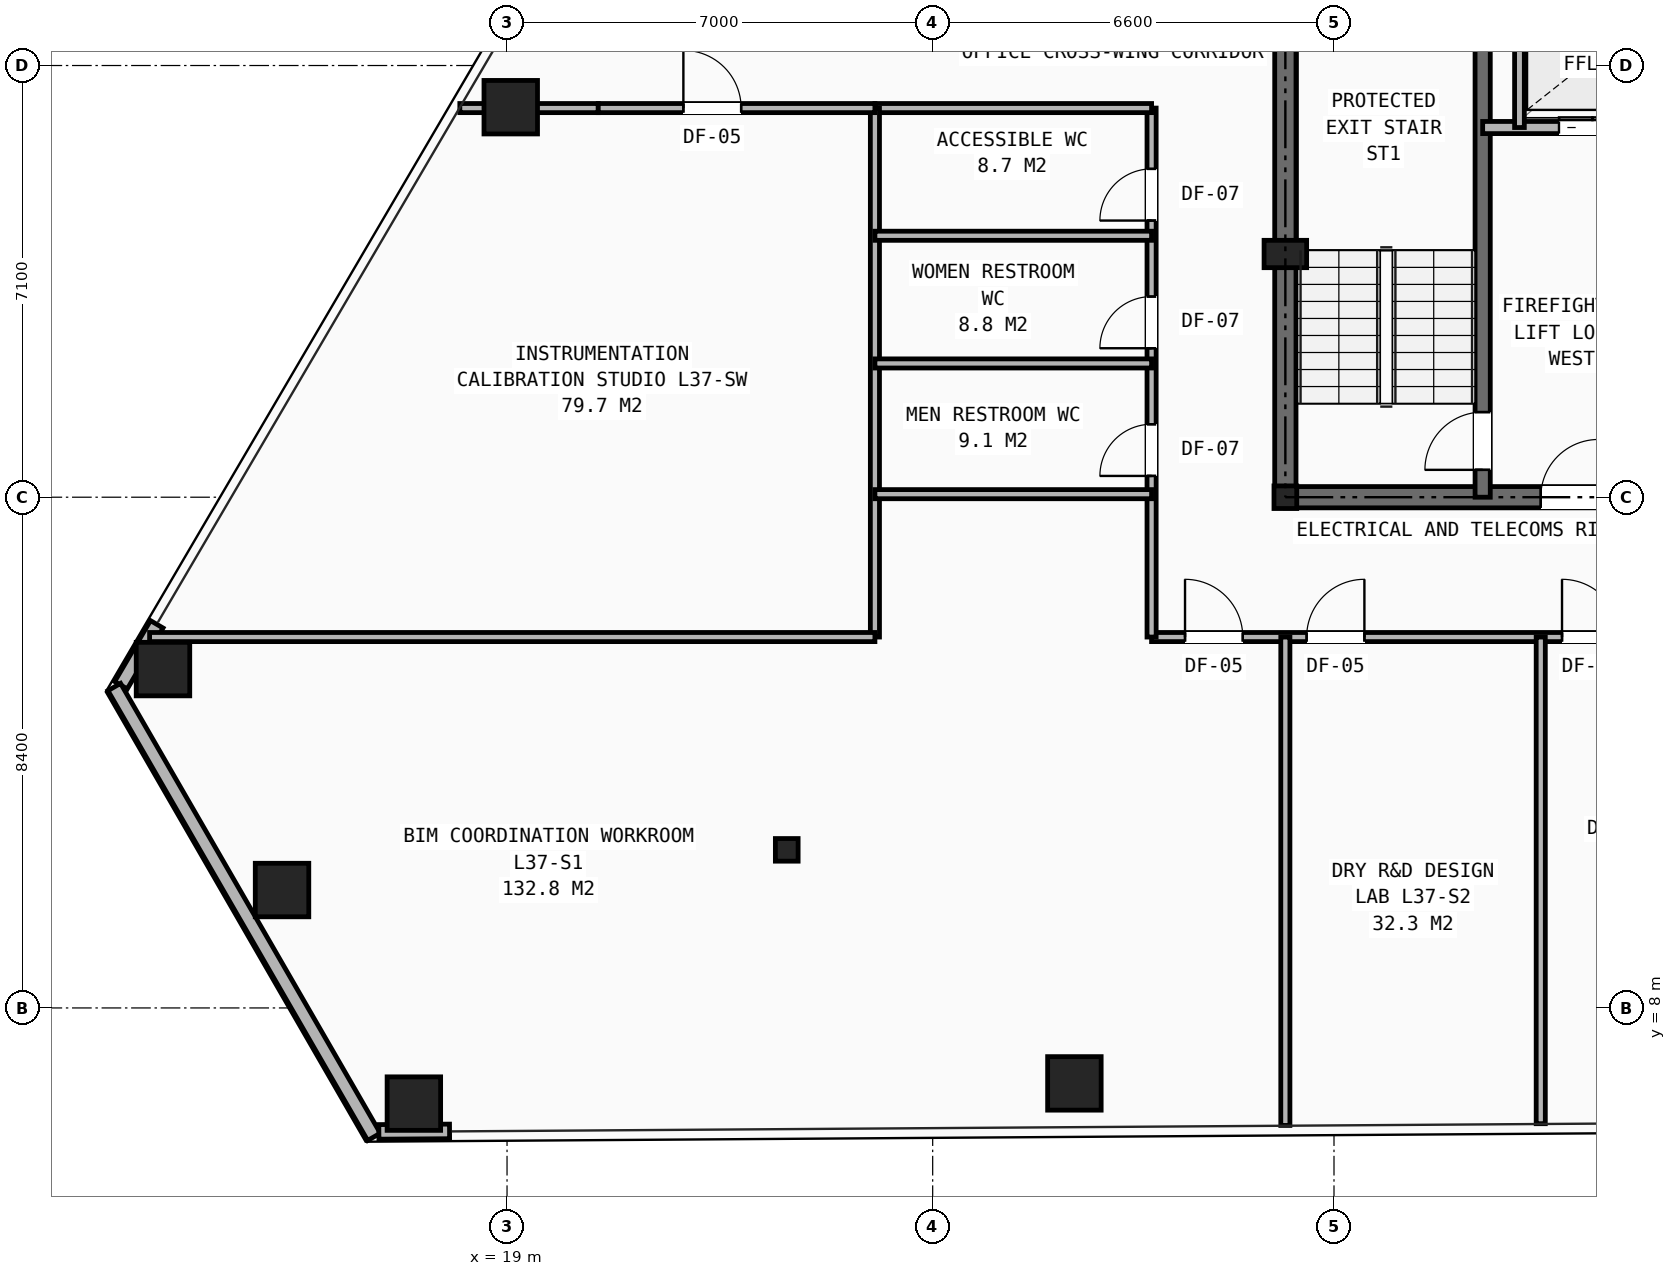
"""IFC4 building model, lengths in metres.
Left out: names, types, materials, properties, quantities, classifications, styles, units other than length and angle.
Written with IfcOpenShell. Run it as: python <this file> out.ifc"""

import sys

from ifc_helpers import new_model, si_unit, direction, frame, frame_2d, origin, origin_2d, place, context, subcontext, project, spatial, rectangle, hollow_rectangle, i_section, extrude, element, fill, save


model = new_model("IFC4")
c1 = context("Model", 3, precision=1e-05, world=origin(), true_north=direction((0.0, 1.0)))
c2 = subcontext(c1, "Body", "Model", "MODEL_VIEW")
j1 = project(units=[si_unit("LENGTHUNIT", "METRE"), si_unit("PLANEANGLEUNIT", "RADIAN")], contexts=[c1])
p1 = place(None, origin())
s1 = spatial("IfcSite", under=j1, at=p1, CompositionType="ELEMENT")
p2 = place(p1, origin())
s2 = spatial("IfcBuilding", under=s1, at=p2, CompositionType="ELEMENT")
p3 = place(p2, frame((0.0, 0.0, 129.8)))
s3 = spatial("IfcBuildingStorey", under=s2, at=p3, CompositionType="ELEMENT", Elevation=129.8)
for number, where, z_axis, x_axis in (
    (1, (31.8, 16.4, 0.0), (0.0, 0.0, 1.0), (1.0, 0.0, 0.0)),
    (2, (23.6, 10.6, 0.0), (0.0, 0.0, 1.0), (1.0, 0.0, 0.0)),
):
    element("IfcColumn", number, at=place(p3, frame(where, z_axis=z_axis, x_axis=x_axis)), inside=s3, PredefinedType="COLUMN", context=c2, shape_type="SweptSolid", body=[
        extrude(i_section(OverallWidth=0.374, OverallDepth=0.372, WebThickness=0.016, FlangeThickness=0.026, at=origin_2d()), origin(), (0.0, 0.0, 1.0), 3.45),
    ])
p4 = place(p3, frame((31.8, 20.4, 0.0), z_axis=(0.0, 0.0, 1.0), x_axis=(1.0, 0.0, 0.0)))
e3 = element("IfcColumn", 3, at=p4, inside=s3, PredefinedType="PILASTER", context=c2, shape_type="SweptSolid", body=[
    extrude(rectangle(XDim=0.7, YDim=0.45, at=origin_2d()), origin(), (0.0, 0.0, 1.0), 3.45),
])
for number, where, z_axis, x_axis in (
    (4, (19.061, 22.814, 0.0), (0.0, 0.0, 1.0), (1.0, 0.0, 0.0)),
    (5, (13.342, 13.573, 0.0), (0.0, 0.0, 1.0), (1.0, 0.0, 0.0)),
    (6, (15.3, 9.939, 0.0), (0.0, 0.0, 1.0), (1.0, 0.0, 0.0)),
    (7, (17.468, 6.427, 0.0), (0.0, 0.0, 1.0), (1.0, 0.0, 0.0)),
    (8, (28.331, 6.759, 0.0), (0.0, 0.0, 1.0), (1.0, 0.0, 0.0)),
):
    element("IfcColumn", number, at=place(p3, frame(where, z_axis=z_axis, x_axis=x_axis)), inside=s3, PredefinedType="COLUMN", context=c2, shape_type="SweptSolid", body=[
        extrude(hollow_rectangle(XDim=0.88, YDim=0.88, WallThickness=0.06, at=origin_2d()), origin(), (0.0, 0.0, 1.0), 3.45),
    ])
p5 = place(p3, frame((13.239, 14.31, 0.0), z_axis=(0.0, 0.0, 1.0), x_axis=(-0.505854218529, -0.862618982863, 0.0)))
e9 = element("IfcWall", 9, at=p5, inside=s3, PredefinedType="SHEAR", context=c2, shape_type="SweptSolid", body=[
    extrude(rectangle(XDim=1.163, YDim=0.24, at=frame_2d((0.581, 0.0))), origin(), (0.0, 0.0, 1.0), 2.583),
])
p6 = place(p3, frame((16.812, 5.88, 0.0), z_axis=(0.0, 0.0, 1.0), x_axis=(-0.499999516514, 0.866025682925, 0.0)))
e10 = element("IfcWall", 10, at=p6, inside=s3, PredefinedType="SHEAR", context=c2, shape_type="SweptSolid", body=[
    extrude(rectangle(XDim=8.543, YDim=0.24, at=frame_2d((4.271, 0.0))), origin(), (0.0, 0.0, 1.0), 2.583),
])
p7 = place(p3, frame((16.892, 5.961, 0.0), z_axis=(0.0, 0.0, 1.0), x_axis=(0.999977422468, 0.006719713885, 0.0)))
e11 = element("IfcWall", 11, at=p7, inside=s3, PredefinedType="SHEAR", context=c2, shape_type="SweptSolid", body=[
    extrude(rectangle(XDim=1.163, YDim=0.24, at=frame_2d((0.581, 0.0))), origin(), (0.0, 0.0, 1.0), 2.583),
])
p8 = place(p3, frame((31.8, 16.4, 0.0), z_axis=(0.0, 0.0, 1.0), x_axis=(1.0, 0.0, 0.0)))
e12 = element("IfcWall", 12, at=p8, inside=s3, PredefinedType="SHEAR", context=c2, shape_type="SweptSolid", body=[
    extrude(rectangle(XDim=16.4, YDim=0.35, at=frame_2d((8.2, 0.0))), origin(), (0.0, 0.0, 1.0), 3.21),
])
p9 = place(p8, frame((7.75, 0.0, 0.0)))
e13 = element("IfcOpeningElement", 13, at=p9, cuts=e12, PredefinedType="OPENING", context=c2, shape_type="SweptSolid", body=[
    extrude(rectangle(XDim=0.9, YDim=2.1, at=frame_2d((0.45, 1.05))), frame((0.0, 0.185, 0.0), z_axis=(0.0, -1.0, 0.0), x_axis=(1.0, 0.0, 0.0)), (0.0, 0.0, 1.0), 0.37),
])
p10 = place(p8, frame((4.2, 0.0, 0.0)))
e14 = element("IfcOpeningElement", 14, at=p10, cuts=e12, PredefinedType="OPENING", context=c2, shape_type="SweptSolid", body=[
    extrude(rectangle(XDim=0.95, YDim=2.1, at=frame_2d((0.475, 1.05))), frame((0.0, 0.185, 0.0), z_axis=(0.0, -1.0, 0.0), x_axis=(1.0, 0.0, 0.0)), (0.0, 0.0, 1.0), 0.37),
])
p11 = place(p8, frame((10.6, 0.0, 0.0)))
e15 = element("IfcOpeningElement", 15, at=p11, cuts=e12, PredefinedType="OPENING", context=c2, shape_type="SweptSolid", body=[
    extrude(rectangle(XDim=0.95, YDim=2.1, at=frame_2d((0.475, 1.05))), frame((0.0, 0.185, 0.0), z_axis=(0.0, -1.0, 0.0), x_axis=(1.0, 0.0, 0.0)), (0.0, 0.0, 1.0), 0.37),
])
p12 = place(p3, frame((31.8, 16.4, 0.0), z_axis=(0.0, 0.0, 1.0), x_axis=(0.0, 1.0, 0.0)))
e16 = element("IfcWall", 16, at=p12, inside=s3, PredefinedType="SHEAR", context=c2, shape_type="SweptSolid", body=[
    extrude(rectangle(XDim=14.8, YDim=0.35, at=frame_2d((7.4, 0.0))), origin(), (0.0, 0.0, 1.0), 3.21),
])
p13 = place(p12, frame((11.0, 0.0, 0.0)))
e17 = element("IfcOpeningElement", 17, at=p13, cuts=e16, PredefinedType="OPENING", context=c2, shape_type="SweptSolid", body=[
    extrude(rectangle(XDim=1.1, YDim=2.15, at=frame_2d((0.55, 1.075))), frame((0.0, 0.185, 0.0), z_axis=(0.0, -1.0, 0.0), x_axis=(1.0, 0.0, 0.0)), (0.0, 0.0, 1.0), 0.37),
])
p14 = place(p3, frame((35.045, 16.4, 0.0), z_axis=(0.0, 0.0, 1.0), x_axis=(0.0, 1.0, 0.0)))
e18 = element("IfcWall", 18, at=p14, inside=s3, PredefinedType="SHEAR", context=c2, shape_type="SweptSolid", body=[
    extrude(rectangle(XDim=8.4, YDim=0.25, at=frame_2d((4.2, 0.0))), origin(), (0.0, 0.0, 1.0), 3.21),
])
p15 = place(p14, frame((0.45, 0.0, 0.0)))
e19 = element("IfcOpeningElement", 19, at=p15, cuts=e18, PredefinedType="OPENING", context=c2, shape_type="SweptSolid", body=[
    extrude(rectangle(XDim=0.95, YDim=2.1, at=frame_2d((0.475, 1.05))), frame((0.0, 0.135, 0.0), z_axis=(0.0, -1.0, 0.0), x_axis=(1.0, 0.0, 0.0)), (0.0, 0.0, 1.0), 0.27),
])
p16 = place(p3, frame((35.045, 22.48, 0.0), z_axis=(0.0, 0.0, 1.0), x_axis=(1.0, 0.0, 0.0)))
e20 = element("IfcWall", 20, at=p16, inside=s3, PredefinedType="SOLIDWALL", context=c2, shape_type="SweptSolid", body=[
    extrude(rectangle(XDim=9.91, YDim=0.2, at=frame_2d((4.955, 0.0))), origin(), (0.0, 0.0, 1.0), 3.21),
])
p17 = place(p16, frame((1.255, 0.0, 0.0)))
e21 = element("IfcOpeningElement", 21, at=p17, cuts=e20, PredefinedType="OPENING", context=c2, shape_type="SweptSolid", body=[
    extrude(rectangle(XDim=1.1, YDim=2.15, at=frame_2d((0.55, 1.075))), frame((0.0, 0.11, 0.0), z_axis=(0.0, -1.0, 0.0), x_axis=(1.0, 0.0, 0.0)), (0.0, 0.0, 1.0), 0.22),
])
p18 = place(p16, frame((7.555, 0.0, 0.0)))
e22 = element("IfcOpeningElement", 22, at=p18, cuts=e20, PredefinedType="OPENING", context=c2, shape_type="SweptSolid", body=[
    extrude(rectangle(XDim=1.1, YDim=2.15, at=frame_2d((0.55, 1.075))), frame((0.0, 0.11, 0.0), z_axis=(0.0, -1.0, 0.0), x_axis=(1.0, 0.0, 0.0)), (0.0, 0.0, 1.0), 0.22),
])
p19 = place(p16, frame((4.405, 0.0, 0.0)))
e23 = element("IfcOpeningElement", 23, at=p19, cuts=e20, PredefinedType="OPENING", context=c2, shape_type="SweptSolid", body=[
    extrude(rectangle(XDim=1.1, YDim=2.15, at=frame_2d((0.55, 1.075))), frame((0.0, 0.11, 0.0), z_axis=(0.0, -1.0, 0.0), x_axis=(1.0, 0.0, 0.0)), (0.0, 0.0, 1.0), 0.22),
])
p20 = place(p3, frame((35.65, 22.48, 0.0), z_axis=(0.0, 0.0, 1.0), x_axis=(0.0, 1.0, 0.0)))
e24 = element("IfcWall", 24, at=p20, inside=s3, PredefinedType="SOLIDWALL", context=c2, shape_type="SweptSolid", body=[
    extrude(rectangle(XDim=2.32, YDim=0.16, at=frame_2d((1.16, 0.0))), origin(), (0.0, 0.0, 1.0), 3.21),
])
p21 = place(p3, frame((29.6, 14.1, 0.0), z_axis=(0.0, 0.0, 1.0), x_axis=(1.0, 0.0, 0.0)))
e25 = element("IfcWall", 25, at=p21, inside=s3, PredefinedType="PARTITIONING", context=c2, shape_type="SweptSolid", body=[
    extrude(rectangle(XDim=18.6, YDim=0.15, at=frame_2d((9.3, 0.0))), origin(), (0.0, 0.0, 1.0), 2.252),
])
p22 = place(p21, frame((0.55, 0.0, 0.0)))
e26 = element("IfcOpeningElement", 26, at=p22, cuts=e25, PredefinedType="OPENING", context=c2, shape_type="SweptSolid", body=[
    extrude(rectangle(XDim=0.95, YDim=2.1, at=frame_2d((0.475, 1.05))), frame((0.0, 0.085, 0.0), z_axis=(0.0, -1.0, 0.0), x_axis=(1.0, 0.0, 0.0)), (0.0, 0.0, 1.0), 0.17),
])
p23 = place(p21, frame((2.55, 0.0, 0.0)))
e27 = element("IfcOpeningElement", 27, at=p23, cuts=e25, PredefinedType="OPENING", context=c2, shape_type="SweptSolid", body=[
    extrude(rectangle(XDim=0.95, YDim=2.1, at=frame_2d((0.475, 1.05))), frame((0.0, 0.085, 0.0), z_axis=(0.0, -1.0, 0.0), x_axis=(1.0, 0.0, 0.0)), (0.0, 0.0, 1.0), 0.17),
])
p24 = place(p21, frame((6.75, 0.0, 0.0)))
e28 = element("IfcOpeningElement", 28, at=p24, cuts=e25, PredefinedType="OPENING", context=c2, shape_type="SweptSolid", body=[
    extrude(rectangle(XDim=0.95, YDim=2.1, at=frame_2d((0.475, 1.05))), frame((0.0, 0.085, 0.0), z_axis=(0.0, -1.0, 0.0), x_axis=(1.0, 0.0, 0.0)), (0.0, 0.0, 1.0), 0.17),
])
p25 = place(p21, frame((10.95, 0.0, 0.0)))
e29 = element("IfcOpeningElement", 29, at=p25, cuts=e25, PredefinedType="OPENING", context=c2, shape_type="SweptSolid", body=[
    extrude(rectangle(XDim=0.95, YDim=2.1, at=frame_2d((0.475, 1.05))), frame((0.0, 0.085, 0.0), z_axis=(0.0, -1.0, 0.0), x_axis=(1.0, 0.0, 0.0)), (0.0, 0.0, 1.0), 0.17),
])
p26 = place(p21, frame((15.15, 0.0, 0.0)))
e30 = element("IfcOpeningElement", 30, at=p26, cuts=e25, PredefinedType="OPENING", context=c2, shape_type="SweptSolid", body=[
    extrude(rectangle(XDim=0.95, YDim=2.1, at=frame_2d((0.475, 1.05))), frame((0.0, 0.085, 0.0), z_axis=(0.0, -1.0, 0.0), x_axis=(1.0, 0.0, 0.0)), (0.0, 0.0, 1.0), 0.17),
])
p27 = place(p3, frame((29.6, 14.1, 0.0), z_axis=(0.0, 0.0, 1.0), x_axis=(0.0, 1.0, 0.0)))
e31 = element("IfcWall", 31, at=p27, inside=s3, PredefinedType="PARTITIONING", context=c2, shape_type="SweptSolid", body=[
    extrude(rectangle(XDim=8.7, YDim=0.15, at=frame_2d((4.35, 0.0))), origin(), (0.0, 0.0, 1.0), 3.21),
])
p28 = place(p27, frame((2.65, 0.0, 0.0)))
e32 = element("IfcOpeningElement", 32, at=p28, cuts=e31, PredefinedType="OPENING", context=c2, shape_type="SweptSolid", body=[
    extrude(rectangle(XDim=0.85, YDim=2.05, at=frame_2d((0.425, 1.025))), frame((0.0, 0.085, 0.0), z_axis=(0.0, -1.0, 0.0), x_axis=(1.0, 0.0, 0.0)), (0.0, 0.0, 1.0), 0.17),
])
p29 = place(p27, frame((4.75, 0.0, 0.0)))
e33 = element("IfcOpeningElement", 33, at=p29, cuts=e31, PredefinedType="OPENING", context=c2, shape_type="SweptSolid", body=[
    extrude(rectangle(XDim=0.85, YDim=2.05, at=frame_2d((0.425, 1.025))), frame((0.0, 0.085, 0.0), z_axis=(0.0, -1.0, 0.0), x_axis=(1.0, 0.0, 0.0)), (0.0, 0.0, 1.0), 0.17),
])
p30 = place(p27, frame((6.85, 0.0, 0.0)))
e34 = element("IfcOpeningElement", 34, at=p30, cuts=e31, PredefinedType="OPENING", context=c2, shape_type="SweptSolid", body=[
    extrude(rectangle(XDim=0.85, YDim=2.05, at=frame_2d((0.425, 1.025))), frame((0.0, 0.085, 0.0), z_axis=(0.0, -1.0, 0.0), x_axis=(1.0, 0.0, 0.0)), (0.0, 0.0, 1.0), 0.17),
])
p31 = place(p3, frame((18.224, 22.8, 0.0), z_axis=(0.0, 0.0, 1.0), x_axis=(1.0, 0.0, 0.0)))
e35 = element("IfcWall", 35, at=p31, inside=s3, PredefinedType="PARTITIONING", context=c2, shape_type="SweptSolid", body=[
    extrude(rectangle(XDim=2.276, YDim=0.15, at=frame_2d((1.138, 0.0))), origin(), (0.0, 0.0, 1.0), 2.589),
])
p32 = place(p3, frame((25.05, 22.8, 0.0), z_axis=(0.0, 0.0, 1.0), x_axis=(1.0, 0.0, 0.0)))
e36 = element("IfcWall", 36, at=p32, inside=s3, PredefinedType="PARTITIONING", context=c2, shape_type="SweptSolid", body=[
    extrude(rectangle(XDim=4.55, YDim=0.15, at=frame_2d((2.275, 0.0))), origin(), (0.0, 0.0, 1.0), 3.21),
])
p33 = place(p3, frame((25.05, 14.1, 0.0), z_axis=(0.0, 0.0, 1.0), x_axis=(0.0, 1.0, 0.0)))
e37 = element("IfcWall", 37, at=p33, inside=s3, PredefinedType="PARTITIONING", context=c2, shape_type="SweptSolid", body=[
    extrude(rectangle(XDim=8.7, YDim=0.15, at=frame_2d((4.35, 0.0))), origin(), (0.0, 0.0, 1.0), 3.21),
])
for number, where, z_axis, x_axis in (
    (38, (25.05, 16.45, 0.0), (0.0, 0.0, 1.0), (1.0, 0.0, 0.0)),
    (39, (25.05, 18.6, 0.0), (0.0, 0.0, 1.0), (1.0, 0.0, 0.0)),
    (40, (25.05, 20.7, 0.0), (0.0, 0.0, 1.0), (1.0, 0.0, 0.0)),
):
    element("IfcWall", number, at=place(p3, frame(where, z_axis=z_axis, x_axis=x_axis)), inside=s3, PredefinedType="PARTITIONING", context=c2, shape_type="SweptSolid", body=[
        extrude(rectangle(XDim=4.55, YDim=0.15, at=frame_2d((2.275, 0.0))), origin(), (0.0, 0.0, 1.0), 3.21),
    ])
p34 = place(p3, frame((31.8, 6.068, 0.0), z_axis=(0.0, 0.0, 1.0), x_axis=(0.0, 1.0, 0.0)))
e41 = element("IfcWall", 41, at=p34, inside=s3, PredefinedType="PARTITIONING", context=c2, shape_type="SweptSolid", body=[
    extrude(rectangle(XDim=8.032, YDim=0.15, at=frame_2d((4.016, 0.0))), origin(), (0.0, 0.0, 1.0), 2.589),
])
p35 = place(p3, frame((36.0, 6.096, 0.0), z_axis=(0.0, 0.0, 1.0), x_axis=(0.0, 1.0, 0.0)))
e42 = element("IfcWall", 42, at=p35, inside=s3, PredefinedType="PARTITIONING", context=c2, shape_type="SweptSolid", body=[
    extrude(rectangle(XDim=8.004, YDim=0.15, at=frame_2d((4.002, 0.0))), origin(), (0.0, 0.0, 1.0), 2.252),
])
p36 = place(p3, frame((13.122, 14.1, 0.0), z_axis=(0.0, 0.0, 1.0), x_axis=(1.0, 0.0, 0.0)))
e43 = element("IfcWall", 43, at=p36, inside=s3, PredefinedType="PARTITIONING", context=c2, shape_type="SweptSolid", body=[
    extrude(rectangle(XDim=11.928, YDim=0.15, at=frame_2d((5.964, 0.0))), origin(), (0.0, 0.0, 1.0), 2.589),
])
p37 = place(p3, frame((20.5, 22.8, 0.0), z_axis=(0.0, 0.0, 1.0), x_axis=(1.0, 0.0, 0.0)))
e44 = element("IfcWall", 44, at=p37, inside=s3, PredefinedType="PARTITIONING", context=c2, shape_type="SweptSolid", body=[
    extrude(rectangle(XDim=4.55, YDim=0.15, at=frame_2d((2.275, 0.0))), origin(), (0.0, 0.0, 1.0), 3.21),
])
p38 = place(p37, frame((1.4, 0.0, 0.0)))
e45 = element("IfcOpeningElement", 45, at=p38, cuts=e44, PredefinedType="OPENING", context=c2, shape_type="SweptSolid", body=[
    extrude(rectangle(XDim=0.95, YDim=2.1, at=frame_2d((0.475, 1.05))), frame((0.0, 0.085, 0.0), z_axis=(0.0, -1.0, 0.0), x_axis=(1.0, 0.0, 0.0)), (0.0, 0.0, 1.0), 0.17),
])
p39 = place(p15, origin())
e46 = element("IfcDoor", 46, at=p39, inside=s3, OperationType="SINGLE_SWING_LEFT", PredefinedType="DOOR", context=c2, shape_type="SweptSolid", body=[
    extrude(rectangle(XDim=0.95, YDim=2.1, at=frame_2d((0.475, 1.05))), frame((0.0, 0.025, 0.0), z_axis=(0.0, -1.0, 0.0), x_axis=(1.0, 0.0, 0.0)), (0.0, 0.0, 1.0), 0.05),
])
fill(e19, e46)
p40 = place(p10, origin())
e47 = element("IfcDoor", 47, at=p40, inside=s3, OperationType="SINGLE_SWING_RIGHT", PredefinedType="DOOR", context=c2, shape_type="SweptSolid", body=[
    extrude(rectangle(XDim=0.95, YDim=2.1, at=frame_2d((0.475, 1.05))), frame((0.0, 0.025, 0.0), z_axis=(0.0, -1.0, 0.0), x_axis=(1.0, 0.0, 0.0)), (0.0, 0.0, 1.0), 0.05),
])
fill(e14, e47)
p41 = place(p17, origin())
e48 = element("IfcDoor", 48, at=p41, inside=s3, OperationType="DOUBLE_DOOR_SLIDING", PredefinedType="DOOR", context=c2, shape_type="SweptSolid", body=[
    extrude(rectangle(XDim=1.1, YDim=2.15, at=frame_2d((0.55, 1.075))), frame((0.0, 0.025, 0.0), z_axis=(0.0, -1.0, 0.0), x_axis=(1.0, 0.0, 0.0)), (0.0, 0.0, 1.0), 0.05),
])
fill(e21, e48)
p42 = place(p28, origin())
e49 = element("IfcDoor", 49, at=p42, inside=s3, OperationType="SINGLE_SWING_LEFT", PredefinedType="DOOR", context=c2, shape_type="SweptSolid", body=[
    extrude(rectangle(XDim=0.85, YDim=2.05, at=frame_2d((0.425, 1.025))), frame((0.0, 0.025, 0.0), z_axis=(0.0, -1.0, 0.0), x_axis=(1.0, 0.0, 0.0)), (0.0, 0.0, 1.0), 0.05),
])
fill(e32, e49)
p43 = place(p29, origin())
e50 = element("IfcDoor", 50, at=p43, inside=s3, OperationType="SINGLE_SWING_LEFT", PredefinedType="DOOR", context=c2, shape_type="SweptSolid", body=[
    extrude(rectangle(XDim=0.85, YDim=2.05, at=frame_2d((0.425, 1.025))), frame((0.0, 0.025, 0.0), z_axis=(0.0, -1.0, 0.0), x_axis=(1.0, 0.0, 0.0)), (0.0, 0.0, 1.0), 0.05),
])
fill(e33, e50)
p44 = place(p30, origin())
e51 = element("IfcDoor", 51, at=p44, inside=s3, OperationType="SINGLE_SWING_LEFT", PredefinedType="DOOR", context=c2, shape_type="SweptSolid", body=[
    extrude(rectangle(XDim=0.85, YDim=2.05, at=frame_2d((0.425, 1.025))), frame((0.0, 0.025, 0.0), z_axis=(0.0, -1.0, 0.0), x_axis=(1.0, 0.0, 0.0)), (0.0, 0.0, 1.0), 0.05),
])
fill(e34, e51)
p45 = place(p22, origin())
e52 = element("IfcDoor", 52, at=p45, inside=s3, OperationType="SINGLE_SWING_LEFT", PredefinedType="DOOR", context=c2, shape_type="SweptSolid", body=[
    extrude(rectangle(XDim=0.95, YDim=2.1, at=frame_2d((0.475, 1.05))), frame((0.0, 0.025, 0.0), z_axis=(0.0, -1.0, 0.0), x_axis=(1.0, 0.0, 0.0)), (0.0, 0.0, 1.0), 0.05),
])
fill(e26, e52)
p46 = place(p23, origin())
e53 = element("IfcDoor", 53, at=p46, inside=s3, OperationType="SINGLE_SWING_RIGHT", PredefinedType="DOOR", context=c2, shape_type="SweptSolid", body=[
    extrude(rectangle(XDim=0.95, YDim=2.1, at=frame_2d((0.475, 1.05))), frame((0.0, 0.025, 0.0), z_axis=(0.0, -1.0, 0.0), x_axis=(1.0, 0.0, 0.0)), (0.0, 0.0, 1.0), 0.05),
])
fill(e27, e53)
p47 = place(p24, origin())
e54 = element("IfcDoor", 54, at=p47, inside=s3, OperationType="SINGLE_SWING_LEFT", PredefinedType="DOOR", context=c2, shape_type="SweptSolid", body=[
    extrude(rectangle(XDim=0.95, YDim=2.1, at=frame_2d((0.475, 1.05))), frame((0.0, 0.025, 0.0), z_axis=(0.0, -1.0, 0.0), x_axis=(1.0, 0.0, 0.0)), (0.0, 0.0, 1.0), 0.05),
])
fill(e28, e54)
p48 = place(p38, origin())
e55 = element("IfcDoor", 55, at=p48, inside=s3, OperationType="SINGLE_SWING_LEFT", PredefinedType="DOOR", context=c2, shape_type="SweptSolid", body=[
    extrude(rectangle(XDim=0.95, YDim=2.1, at=frame_2d((0.475, 1.05))), frame((0.0, 0.025, 0.0), z_axis=(0.0, -1.0, 0.0), x_axis=(1.0, 0.0, 0.0)), (0.0, 0.0, 1.0), 0.05),
])
fill(e45, e55)
save(model, sys.argv[1])
